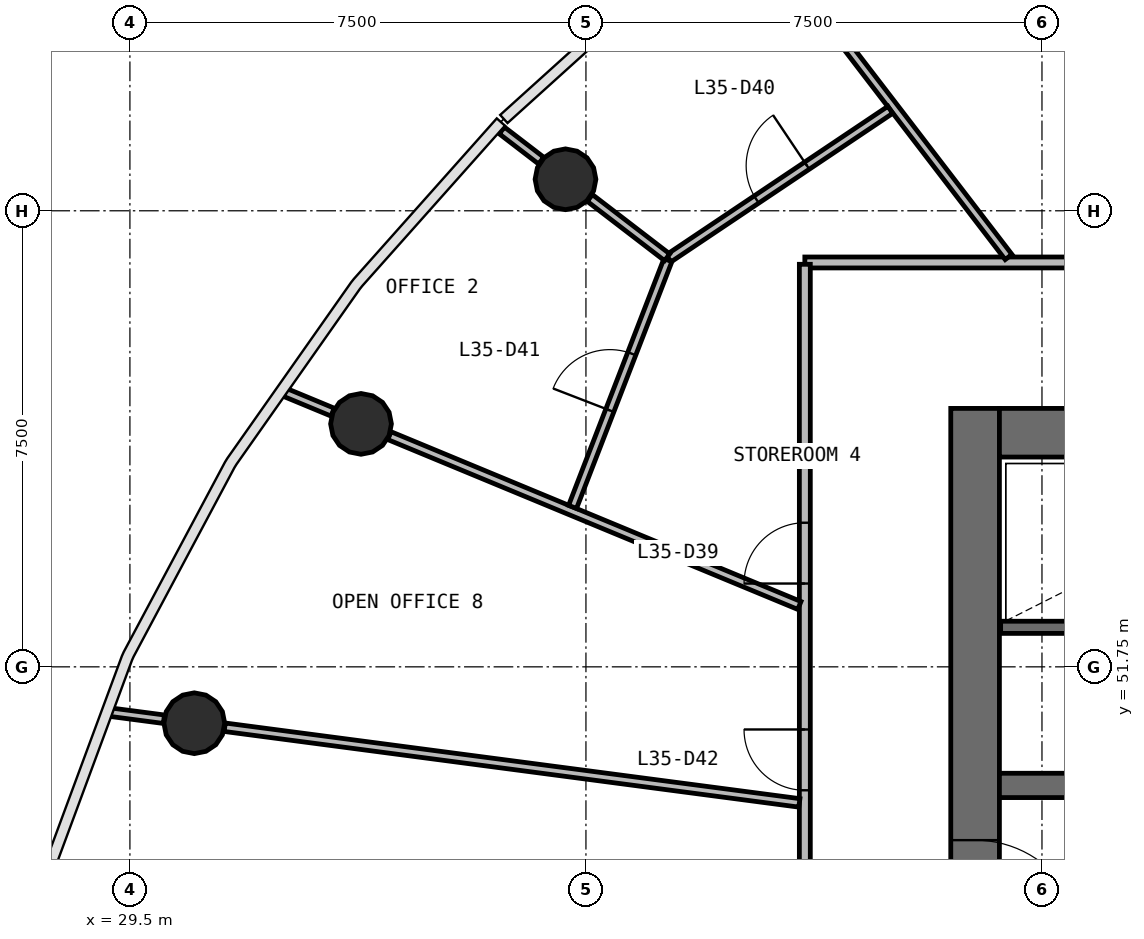
"""IFC4 building model, lengths in metres.
Left out: names, types, materials, properties, quantities, classifications, styles, units other than length and angle.
Written with IfcOpenShell. Run it as: python <this file> out.ifc"""

import sys

from ifc_helpers import new_model, si_unit, direction, frame, frame_2d, origin, origin_2d, place, context, subcontext, project, spatial, rectangle, circle, extrude, source, transform, mapped, element, fill, save


model = new_model("IFC4")
c1 = context("Model", 3, precision=1e-05, world=origin(), true_north=direction((0.0, 1.0)))
c2 = subcontext(c1, "Body", "Model", "MODEL_VIEW")
j1 = project(units=[si_unit("LENGTHUNIT", "METRE"), si_unit("PLANEANGLEUNIT", "RADIAN")], contexts=[c1])
p1 = place(None, origin())
s1 = spatial("IfcSite", under=j1, at=p1, CompositionType="ELEMENT")
p2 = place(p1, origin())
s2 = spatial("IfcBuilding", under=s1, at=p2, CompositionType="ELEMENT")
p3 = place(p2, frame((0.0, 0.0, 148.7)))
s3 = spatial("IfcBuildingStorey", under=s2, at=p3, CompositionType="ELEMENT", Elevation=148.7)
p4 = place(p3, frame((43.4, 56.0, 0.0), z_axis=(0.0, 0.0, 1.0), x_axis=(0.0, -1.0, 0.0)))
e1 = element("IfcWall", 1, at=p4, inside=s3, PredefinedType="SHEAR", context=c2, shape_type="SweptSolid", body=[
    extrude(rectangle(XDim=16.0, YDim=0.8, at=frame_2d((8.0, 0.0))), origin(), (0.0, 0.0, 1.0), 3.9),
])
p5 = place(p4, frame((7.1, 0.0, 0.0)))
e2 = element("IfcOpeningElement", 2, at=p5, cuts=e1, PredefinedType="OPENING", context=c2, shape_type="SweptSolid", body=[
    extrude(rectangle(XDim=1.8, YDim=2.1, at=frame_2d((0.9, 1.05))), frame((0.0, 0.41, 0.0), z_axis=(0.0, -1.0, 0.0), x_axis=(1.0, 0.0, 0.0)), (0.0, 0.0, 1.0), 0.82),
])
p6 = place(p3, frame((60.2, 55.6, 0.0), z_axis=(0.0, 0.0, 1.0), x_axis=(-1.0, 0.0, 0.0)))
e3 = element("IfcWall", 3, at=p6, inside=s3, PredefinedType="SHEAR", context=c2, shape_type="SweptSolid", body=[
    extrude(rectangle(XDim=16.4, YDim=0.8, at=frame_2d((8.2, 0.0))), origin(), (0.0, 0.0, 1.0), 3.9),
])
p7 = place(p6, frame((0.2, 0.0, 0.0)))
e4 = element("IfcOpeningElement", 4, at=p7, cuts=e3, PredefinedType="OPENING", context=c2, shape_type="SweptSolid", body=[
    extrude(rectangle(XDim=1.1, YDim=2.1, at=frame_2d((0.55, 1.05))), frame((0.0, 0.41, 0.0), z_axis=(0.0, -1.0, 0.0), x_axis=(1.0, 0.0, 0.0)), (0.0, 0.0, 1.0), 0.82),
])
p8 = place(p6, frame((10.1, 0.0, 0.0)))
e5 = element("IfcOpeningElement", 5, at=p8, cuts=e3, PredefinedType="OPENING", context=c2, shape_type="SweptSolid", body=[
    extrude(rectangle(XDim=1.2, YDim=2.1, at=frame_2d((0.6, 1.05))), frame((0.0, 0.41, 0.0), z_axis=(0.0, -1.0, 0.0), x_axis=(1.0, 0.0, 0.0)), (0.0, 0.0, 1.0), 0.82),
])
p9 = place(p6, frame((7.05, 0.0, 0.0)))
e6 = element("IfcOpeningElement", 6, at=p9, cuts=e3, PredefinedType="OPENING", context=c2, shape_type="SweptSolid", body=[
    extrude(rectangle(XDim=1.1, YDim=2.1, at=frame_2d((0.55, 1.05))), frame((0.0, 0.41, 0.0), z_axis=(0.0, -1.0, 0.0), x_axis=(1.0, 0.0, 0.0)), (0.0, 0.0, 1.0), 0.82),
])
p10 = place(p3, frame((43.8, 49.8, 0.0), z_axis=(0.0, 0.0, 1.0), x_axis=(1.0, 0.0, 0.0)))
e7 = element("IfcWall", 7, at=p10, inside=s3, PredefinedType="SHEAR", context=c2, shape_type="SweptSolid", body=[
    extrude(rectangle(XDim=16.4, YDim=0.4, at=frame_2d((8.2, 0.0))), origin(), (0.0, 0.0, 1.0), 3.9),
])
p11 = place(p10, frame((9.6, 0.0, 0.0)))
e8 = element("IfcOpeningElement", 8, at=p11, cuts=e7, PredefinedType="OPENING", context=c2, shape_type="SweptSolid", body=[
    extrude(rectangle(XDim=1.1, YDim=2.1, at=frame_2d((0.55, 1.05))), frame((0.0, 0.21, 0.0), z_axis=(0.0, -1.0, 0.0), x_axis=(1.0, 0.0, 0.0)), (0.0, 0.0, 1.0), 0.42),
])
p12 = place(p10, frame((12.1, 0.0, 0.0)))
e9 = element("IfcOpeningElement", 9, at=p12, cuts=e7, PredefinedType="OPENING", context=c2, shape_type="SweptSolid", body=[
    extrude(rectangle(XDim=1.1, YDim=2.1, at=frame_2d((0.55, 1.05))), frame((0.0, 0.21, 0.0), z_axis=(0.0, -1.0, 0.0), x_axis=(1.0, 0.0, 0.0)), (0.0, 0.0, 1.0), 0.42),
])
p13 = place(p10, frame((14.6, 0.0, 0.0)))
e10 = element("IfcOpeningElement", 10, at=p13, cuts=e7, PredefinedType="OPENING", context=c2, shape_type="SweptSolid", body=[
    extrude(rectangle(XDim=1.1, YDim=2.1, at=frame_2d((0.55, 1.05))), frame((0.0, 0.21, 0.0), z_axis=(0.0, -1.0, 0.0), x_axis=(1.0, 0.0, 0.0)), (0.0, 0.0, 1.0), 0.42),
])
p14 = place(p10, frame((2.05, 0.0, 0.0)))
e11 = element("IfcOpeningElement", 11, at=p14, cuts=e7, PredefinedType="OPENING", context=c2, shape_type="SweptSolid", body=[
    extrude(rectangle(XDim=0.9, YDim=2.1, at=frame_2d((0.45, 1.05))), frame((0.0, 0.21, 0.0), z_axis=(0.0, -1.0, 0.0), x_axis=(1.0, 0.0, 0.0)), (0.0, 0.0, 1.0), 0.42),
])
p15 = place(p10, frame((5.05, 0.0, 0.0)))
e12 = element("IfcOpeningElement", 12, at=p15, cuts=e7, PredefinedType="OPENING", context=c2, shape_type="SweptSolid", body=[
    extrude(rectangle(XDim=0.9, YDim=2.1, at=frame_2d((0.45, 1.05))), frame((0.0, 0.21, 0.0), z_axis=(0.0, -1.0, 0.0), x_axis=(1.0, 0.0, 0.0)), (0.0, 0.0, 1.0), 0.42),
])
p16 = place(p10, frame((7.65, 0.0, 0.0)))
e13 = element("IfcOpeningElement", 13, at=p16, cuts=e7, PredefinedType="OPENING", context=c2, shape_type="SweptSolid", body=[
    extrude(rectangle(XDim=0.9, YDim=2.1, at=frame_2d((0.45, 1.05))), frame((0.0, 0.21, 0.0), z_axis=(0.0, -1.0, 0.0), x_axis=(1.0, 0.0, 0.0)), (0.0, 0.0, 1.0), 0.42),
])
m1 = source(origin(), c2, "Body", "SweptSolid", [
    extrude(circle(Radius=0.5, at=origin_2d()), origin(), (0.0, 0.0, 1.0), 3.9),
])
for number, where, z_axis, x_axis in (
    (14, (36.664, 59.768, 0.0), (0.0, 0.0, 1.0), (1.0, 0.0, 0.0)),
    (15, (33.301, 55.746, 0.0), (0.0, 0.0, 1.0), (1.0, 0.0, 0.0)),
    (16, (30.559, 50.823, 0.0), (0.0, 0.0, 1.0), (1.0, 0.0, 0.0)),
):
    element("IfcColumn", number, at=place(p3, frame(where, z_axis=z_axis, x_axis=x_axis)), inside=s3, PredefinedType="COLUMN", context=c2, shape_type="MappedRepresentation", body=[
        mapped(m1, transform((0.0, 0.0, 0.0), scale=1.0)),
    ])
p17 = place(p3, frame((43.82, 52.4, 0.0), z_axis=(0.0, 0.0, 1.0), x_axis=(1.0, 0.0, 0.0)))
e17 = element("IfcWall", 17, at=p17, inside=s3, PredefinedType="SOLIDWALL", context=c2, shape_type="SweptSolid", body=[
    extrude(rectangle(XDim=6.58, YDim=0.2, at=frame_2d((3.29, 0.0))), origin(), (0.0, 0.0, 1.0), 3.58),
])
p18 = place(p3, frame((40.6, 58.4, 0.0), z_axis=(0.0, 0.0, 1.0), x_axis=(1.0, 0.0, 0.0)))
e18 = element("IfcWall", 18, at=p18, inside=s3, PredefinedType="PARTITIONING", context=c2, shape_type="SweptSolid", body=[
    extrude(rectangle(XDim=22.8, YDim=0.18, at=frame_2d((11.4, 0.0))), origin(), (0.0, 0.0, 1.0), 2.88),
])
p19 = place(p18, frame((16.15, 0.0, 0.0)))
e19 = element("IfcOpeningElement", 19, at=p19, cuts=e18, PredefinedType="OPENING", context=c2, shape_type="SweptSolid", body=[
    extrude(rectangle(XDim=1.0, YDim=2.1, at=frame_2d((0.5, 1.05))), frame((0.0, 0.1, 0.0), z_axis=(0.0, -1.0, 0.0), x_axis=(1.0, 0.0, 0.0)), (0.0, 0.0, 1.0), 0.2),
])
p20 = place(p18, frame((10.95, 0.0, 0.0)))
e20 = element("IfcOpeningElement", 20, at=p20, cuts=e18, PredefinedType="OPENING", context=c2, shape_type="SweptSolid", body=[
    extrude(rectangle(XDim=1.0, YDim=2.1, at=frame_2d((0.5, 1.05))), frame((0.0, 0.1, 0.0), z_axis=(0.0, -1.0, 0.0), x_axis=(1.0, 0.0, 0.0)), (0.0, 0.0, 1.0), 0.2),
])
p21 = place(p18, frame((8.75, 0.0, 0.0)))
e21 = element("IfcOpeningElement", 21, at=p21, cuts=e18, PredefinedType="OPENING", context=c2, shape_type="SweptSolid", body=[
    extrude(rectangle(XDim=1.0, YDim=2.1, at=frame_2d((0.5, 1.05))), frame((0.0, 0.1, 0.0), z_axis=(0.0, -1.0, 0.0), x_axis=(1.0, 0.0, 0.0)), (0.0, 0.0, 1.0), 0.2),
])
p22 = place(p3, frame((40.6, 37.63, 0.0), z_axis=(0.0, 0.0, 1.0), x_axis=(0.0, 1.0, 0.0)))
e22 = element("IfcWall", 22, at=p22, inside=s3, PredefinedType="PARTITIONING", context=c2, shape_type="SweptSolid", body=[
    extrude(rectangle(XDim=20.74, YDim=0.18, at=frame_2d((10.37, 0.0))), origin(), (0.0, 0.0, 1.0), 2.88),
])
p23 = place(p22, frame((15.49, 0.0, 0.0)))
e23 = element("IfcOpeningElement", 23, at=p23, cuts=e22, PredefinedType="OPENING", context=c2, shape_type="SweptSolid", body=[
    extrude(rectangle(XDim=1.0, YDim=2.1, at=frame_2d((0.5, 1.05))), frame((0.0, 0.1, 0.0), z_axis=(0.0, -1.0, 0.0), x_axis=(1.0, 0.0, 0.0)), (0.0, 0.0, 1.0), 0.2),
])
p24 = place(p22, frame((12.09, 0.0, 0.0)))
e24 = element("IfcOpeningElement", 24, at=p24, cuts=e22, PredefinedType="OPENING", context=c2, shape_type="SweptSolid", body=[
    extrude(rectangle(XDim=1.0, YDim=2.1, at=frame_2d((0.5, 1.05))), frame((0.0, 0.1, 0.0), z_axis=(0.0, -1.0, 0.0), x_axis=(1.0, 0.0, 0.0)), (0.0, 0.0, 1.0), 0.2),
])
p25 = place(p22, frame((9.89, 0.0, 0.0)))
e25 = element("IfcOpeningElement", 25, at=p25, cuts=e22, PredefinedType="OPENING", context=c2, shape_type="SweptSolid", body=[
    extrude(rectangle(XDim=1.0, YDim=2.1, at=frame_2d((0.5, 1.05))), frame((0.0, 0.1, 0.0), z_axis=(0.0, -1.0, 0.0), x_axis=(1.0, 0.0, 0.0)), (0.0, 0.0, 1.0), 0.2),
])
p26 = place(p22, frame((4.29, 0.0, 0.0)))
e26 = element("IfcOpeningElement", 26, at=p26, cuts=e22, PredefinedType="OPENING", context=c2, shape_type="SweptSolid", body=[
    extrude(rectangle(XDim=1.0, YDim=2.1, at=frame_2d((0.5, 1.05))), frame((0.0, 0.1, 0.0), z_axis=(0.0, -1.0, 0.0), x_axis=(1.0, 0.0, 0.0)), (0.0, 0.0, 1.0), 0.2),
])
p27 = place(p3, frame((40.51, 49.513, 0.0), z_axis=(0.0, 0.0, 1.0), x_axis=(-0.991446186521, 0.130516126334, 0.0)))
e27 = element("IfcWall", 27, at=p27, inside=s3, PredefinedType="PARTITIONING", context=c2, shape_type="SweptSolid", body=[
    extrude(rectangle(XDim=9.532, YDim=0.14, at=frame_2d((4.766, 0.0))), origin(), (0.0, 0.0, 1.0), 2.88),
])
p28 = place(p3, frame((33.767, 55.552, 0.0), z_axis=(0.0, 0.0, 1.0), x_axis=(0.923876577678, -0.382690565886, 0.0)))
e28 = element("IfcWall", 28, at=p28, inside=s3, PredefinedType="PARTITIONING", context=c2, shape_type="SweptSolid", body=[
    extrude(rectangle(XDim=7.298, YDim=0.14, at=frame_2d((3.649, 0.0))), origin(), (0.0, 0.0, 1.0), 2.88),
])
p29 = place(p3, frame((40.763, 62.644, 0.0), z_axis=(0.0, 0.0, 1.0), x_axis=(0.608736894437, -0.793372165728, 0.0)))
e29 = element("IfcWall", 29, at=p29, inside=s3, PredefinedType="PARTITIONING", context=c2, shape_type="SweptSolid", body=[
    extrude(rectangle(XDim=5.236, YDim=0.14, at=frame_2d((2.618, 0.0))), origin(), (0.0, 0.0, 1.0), 2.88),
])
p30 = place(p3, frame((38.359, 58.467, 0.0), z_axis=(0.0, 0.0, 1.0), x_axis=(0.830687145269, 0.55673949625, 0.0)))
e30 = element("IfcWall", 30, at=p30, inside=s3, PredefinedType="PARTITIONING", context=c2, shape_type="SweptSolid", body=[
    extrude(rectangle(XDim=4.389, YDim=0.14, at=frame_2d((2.195, 0.0))), origin(), (0.0, 0.0, 1.0), 2.88),
])
p31 = place(p30, frame((1.739, 0.0, 0.0)))
e31 = element("IfcOpeningElement", 31, at=p31, cuts=e30, PredefinedType="OPENING", context=c2, shape_type="SweptSolid", body=[
    extrude(rectangle(XDim=1.0, YDim=2.1, at=frame_2d((0.5, 1.05))), frame((0.0, 0.08, 0.0), z_axis=(0.0, -1.0, 0.0), x_axis=(1.0, 0.0, 0.0)), (0.0, 0.0, 1.0), 0.16),
])
p32 = place(p3, frame((36.78, 54.38, 0.0), z_axis=(0.0, 0.0, 1.0), x_axis=(0.360482491494, 0.932765979936, 0.0)))
e32 = element("IfcWall", 32, at=p32, inside=s3, PredefinedType="PARTITIONING", context=c2, shape_type="SweptSolid", body=[
    extrude(rectangle(XDim=4.351, YDim=0.14, at=frame_2d((2.176, 0.0))), origin(), (0.0, 0.0, 1.0), 2.88),
])
p33 = place(p32, frame((1.701, 0.0, 0.0)))
e33 = element("IfcOpeningElement", 33, at=p33, cuts=e32, PredefinedType="OPENING", context=c2, shape_type="SweptSolid", body=[
    extrude(rectangle(XDim=1.0, YDim=2.1, at=frame_2d((0.5, 1.05))), frame((0.0, 0.08, 0.0), z_axis=(0.0, -1.0, 0.0), x_axis=(1.0, 0.0, 0.0)), (0.0, 0.0, 1.0), 0.16),
])
p34 = place(p3, frame((38.335, 58.485, 0.0), z_axis=(0.0, 0.0, 1.0), x_axis=(-0.793297349566, 0.608834390595, 0.0)))
e34 = element("IfcWall", 34, at=p34, inside=s3, PredefinedType="PARTITIONING", context=c2, shape_type="SweptSolid", body=[
    extrude(rectangle(XDim=1.603, YDim=0.14, at=frame_2d((0.801, 0.0))), origin(), (0.0, 0.0, 1.0), 2.88),
])
p35 = place(p3, frame((30.059, 50.889, 0.0), z_axis=(0.0, 0.0, 1.0), x_axis=(-0.99146844902, 0.13034690099, 0.0)))
e35 = element("IfcWall", 35, at=p35, inside=s3, PredefinedType="PARTITIONING", context=c2, shape_type="SweptSolid", body=[
    extrude(rectangle(XDim=0.88, YDim=0.14, at=frame_2d((0.44, 0.0))), origin(), (0.0, 0.0, 1.0), 2.88),
])
p36 = place(p3, frame((32.834, 55.939, 0.0), z_axis=(0.0, 0.0, 1.0), x_axis=(-0.923855963606, 0.38274032778, 0.0)))
e36 = element("IfcWall", 36, at=p36, inside=s3, PredefinedType="PARTITIONING", context=c2, shape_type="SweptSolid", body=[
    extrude(rectangle(XDim=0.851, YDim=0.14, at=frame_2d((0.425, 0.0))), origin(), (0.0, 0.0, 1.0), 2.88),
])
p37 = place(p3, frame((36.263, 60.075, 0.0), z_axis=(0.0, 0.0, 1.0), x_axis=(-0.79344724315, 0.608639032873, 0.0)))
e37 = element("IfcWall", 37, at=p37, inside=s3, PredefinedType="PARTITIONING", context=c2, shape_type="SweptSolid", body=[
    extrude(rectangle(XDim=0.815, YDim=0.14, at=frame_2d((0.408, 0.0))), origin(), (0.0, 0.0, 1.0), 2.88),
])
m2 = source(origin(), c2, "Body", "SweptSolid", [
    extrude(rectangle(XDim=1.8, YDim=2.1, at=frame_2d((0.9, 1.05))), frame((0.0, 0.025, 0.0), z_axis=(0.0, -1.0, 0.0), x_axis=(1.0, 0.0, 0.0)), (0.0, 0.0, 1.0), 0.05),
])
p38 = place(p5, origin())
e38 = element("IfcDoor", 38, at=p38, inside=s3, OperationType="SINGLE_SWING_RIGHT", PredefinedType="DOOR", context=c2, shape_type="MappedRepresentation", body=[
    mapped(m2, transform((0.0, 0.0, 0.0), scale=1.0)),
])
fill(e2, e38)
m3 = source(origin(), c2, "Body", "SweptSolid", [
    extrude(rectangle(XDim=1.0, YDim=2.1, at=frame_2d((0.5, 1.05))), frame((0.0, 0.025, 0.0), z_axis=(0.0, -1.0, 0.0), x_axis=(1.0, 0.0, 0.0)), (0.0, 0.0, 1.0), 0.05),
])
p39 = place(p23, origin())
e39 = element("IfcDoor", 39, at=p39, inside=s3, OperationType="SINGLE_SWING_LEFT", PredefinedType="DOOR", context=c2, shape_type="MappedRepresentation", body=[
    mapped(m3, transform((0.0, 0.0, 0.0), scale=1.0)),
])
fill(e23, e39)
p40 = place(p31, origin())
e40 = element("IfcDoor", 40, at=p40, inside=s3, OperationType="SINGLE_SWING_RIGHT", PredefinedType="DOOR", context=c2, shape_type="MappedRepresentation", body=[
    mapped(m3, transform((0.0, 0.0, 0.0), scale=1.0)),
])
fill(e31, e40)
p41 = place(p33, origin())
e41 = element("IfcDoor", 41, at=p41, inside=s3, OperationType="SINGLE_SWING_LEFT", PredefinedType="DOOR", context=c2, shape_type="MappedRepresentation", body=[
    mapped(m3, transform((0.0, 0.0, 0.0), scale=1.0)),
])
fill(e33, e41)
p42 = place(p24, origin())
e42 = element("IfcDoor", 42, at=p42, inside=s3, OperationType="SINGLE_SWING_RIGHT", PredefinedType="DOOR", context=c2, shape_type="MappedRepresentation", body=[
    mapped(m3, transform((0.0, 0.0, 0.0), scale=1.0)),
])
fill(e24, e42)
save(model, sys.argv[1])
